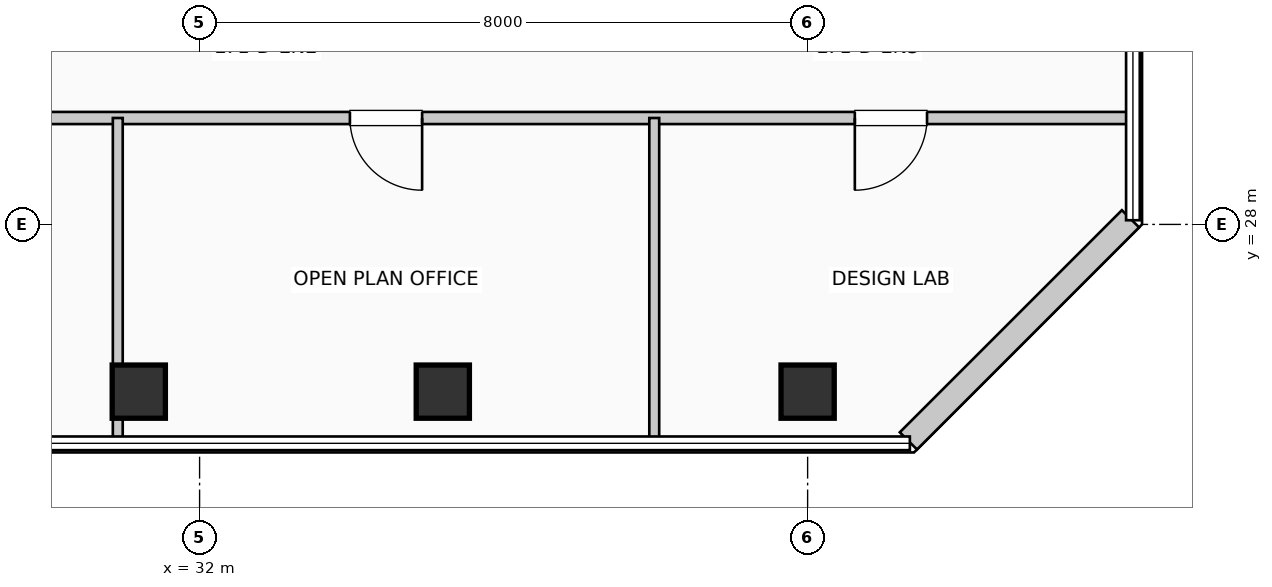
"""IFC4 building model, lengths in metres.
Left out: names, types, materials, properties, quantities, classifications, styles, units other than length and angle.
Written with IfcOpenShell. Run it as: python <this file> out.ifc"""

import sys

from ifc_helpers import new_model, si_unit, direction, frame, frame_2d, origin, origin_2d, place, context, subcontext, project, spatial, rectangle, extrude, element, fill, save


model = new_model("IFC4")
c1 = context("Model", 3, precision=1e-05, world=origin(), true_north=direction((0.0, 1.0)))
c2 = subcontext(c1, "Body", "Model", "MODEL_VIEW")
j1 = project(units=[si_unit("LENGTHUNIT", "METRE"), si_unit("PLANEANGLEUNIT", "RADIAN")], contexts=[c1])
p1 = place(None, origin())
s1 = spatial("IfcSite", under=j1, at=p1, CompositionType="ELEMENT")
p2 = place(p1, origin())
s2 = spatial("IfcBuilding", under=s1, at=p2, CompositionType="ELEMENT")
p3 = place(p2, frame((0.0, 0.0, 292.05)))
s3 = spatial("IfcBuildingStorey", under=s2, at=p3, CompositionType="ELEMENT", Elevation=292.05)
for number, where, z_axis, x_axis in (
    (1, (31.2, 25.8, 0.0), (0.0, 0.0, 1.0), (1.0, 0.0, 0.0)),
    (2, (35.2, 25.8, 0.0), (0.0, 0.0, 1.0), (1.0, 0.0, 0.0)),
    (3, (40.0, 25.8, 0.0), (0.0, 0.0, 1.0), (1.0, 0.0, 0.0)),
):
    element("IfcColumn", number, at=place(p3, frame(where, z_axis=z_axis, x_axis=x_axis)), inside=s3, PredefinedType="COLUMN", context=c2, shape_type="SweptSolid", body=[
        extrude(rectangle(XDim=0.7, YDim=0.7, at=origin_2d()), origin(), (0.0, 0.0, 1.0), 3.96),
    ])
p4 = place(p3, frame((41.326, 25.152, 0.0), z_axis=(0.0, 0.0, 1.0), x_axis=(0.707136318428, 0.707077242712, 0.0)))
e4 = element("IfcWall", 4, at=p4, inside=s3, PredefinedType="SOLIDWALL", context=c2, shape_type="SweptSolid", body=[
    extrude(rectangle(XDim=4.133, YDim=0.32, at=frame_2d((2.066, 0.0))), origin(), (0.0, 0.0, 1.0), 3.74),
])
p5 = place(p3, frame((23.45, 29.4, 0.0), z_axis=(0.0, 0.0, 1.0), x_axis=(1.0, 0.0, 0.0)))
e5 = element("IfcWall", 5, at=p5, inside=s3, PredefinedType="PARTITIONING", context=c2, shape_type="SweptSolid", body=[
    extrude(rectangle(XDim=20.76, YDim=0.16, at=frame_2d((10.38, 0.0))), origin(), (0.0, 0.0, 1.0), 3.425),
])
p6 = place(p5, frame((4.212, 0.0, 0.0), z_axis=(0.0, 0.0, 1.0), x_axis=(-1.0, 0.0, 0.0)))
e6 = element("IfcOpeningElement", 6, at=p6, cuts=e5, PredefinedType="OPENING", context=c2, shape_type="SweptSolid", body=[
    extrude(rectangle(XDim=0.95, YDim=2.15, at=frame_2d((0.475, 1.075))), frame((0.0, 0.09, 0.0), z_axis=(0.0, -1.0, 0.0), x_axis=(1.0, 0.0, 0.0)), (0.0, 0.0, 1.0), 0.18),
])
p7 = place(p5, frame((11.478, 0.0, 0.0), z_axis=(0.0, 0.0, 1.0), x_axis=(-1.0, 0.0, 0.0)))
e7 = element("IfcOpeningElement", 7, at=p7, cuts=e5, PredefinedType="OPENING", context=c2, shape_type="SweptSolid", body=[
    extrude(rectangle(XDim=0.95, YDim=2.15, at=frame_2d((0.475, 1.075))), frame((0.0, 0.09, 0.0), z_axis=(0.0, -1.0, 0.0), x_axis=(1.0, 0.0, 0.0)), (0.0, 0.0, 1.0), 0.18),
])
p8 = place(p5, frame((18.121, 0.0, 0.0), z_axis=(0.0, 0.0, 1.0), x_axis=(-1.0, 0.0, 0.0)))
e8 = element("IfcOpeningElement", 8, at=p8, cuts=e5, PredefinedType="OPENING", context=c2, shape_type="SweptSolid", body=[
    extrude(rectangle(XDim=0.95, YDim=2.15, at=frame_2d((0.475, 1.075))), frame((0.0, 0.09, 0.0), z_axis=(0.0, -1.0, 0.0), x_axis=(1.0, 0.0, 0.0)), (0.0, 0.0, 1.0), 0.18),
])
p9 = place(p3, frame((30.924, 25.19, 0.0), z_axis=(0.0, 0.0, 1.0), x_axis=(0.0, 1.0, 0.0)))
e9 = element("IfcWall", 9, at=p9, inside=s3, PredefinedType="PARTITIONING", context=c2, shape_type="SweptSolid", body=[
    extrude(rectangle(XDim=4.21, YDim=0.13, at=frame_2d((2.105, 0.0))), origin(), (0.0, 0.0, 1.0), 3.175),
])
p10 = place(p3, frame((37.982, 25.19, 0.0), z_axis=(0.0, 0.0, 1.0), x_axis=(0.0, 1.0, 0.0)))
e10 = element("IfcWall", 10, at=p10, inside=s3, PredefinedType="PARTITIONING", context=c2, shape_type="SweptSolid", body=[
    extrude(rectangle(XDim=4.21, YDim=0.13, at=frame_2d((2.105, 0.0))), origin(), (0.0, 0.0, 1.0), 3.74),
])
p11 = place(p7, origin())
e11 = element("IfcDoor", 11, at=p11, inside=s3, OperationType="SINGLE_SWING_RIGHT", PredefinedType="DOOR", context=c2, shape_type="SweptSolid", body=[
    extrude(rectangle(XDim=0.95, YDim=2.15, at=frame_2d((0.475, 1.075))), frame((0.0, 0.025, 0.0), z_axis=(0.0, -1.0, 0.0), x_axis=(1.0, 0.0, 0.0)), (0.0, 0.0, 1.0), 0.05),
])
fill(e7, e11)
p12 = place(p8, origin())
e12 = element("IfcDoor", 12, at=p12, inside=s3, OperationType="SINGLE_SWING_LEFT", PredefinedType="DOOR", context=c2, shape_type="SweptSolid", body=[
    extrude(rectangle(XDim=0.95, YDim=2.15, at=frame_2d((0.475, 1.075))), frame((0.0, 0.025, 0.0), z_axis=(0.0, -1.0, 0.0), x_axis=(1.0, 0.0, 0.0)), (0.0, 0.0, 1.0), 0.05),
])
fill(e8, e12)
save(model, sys.argv[1])
